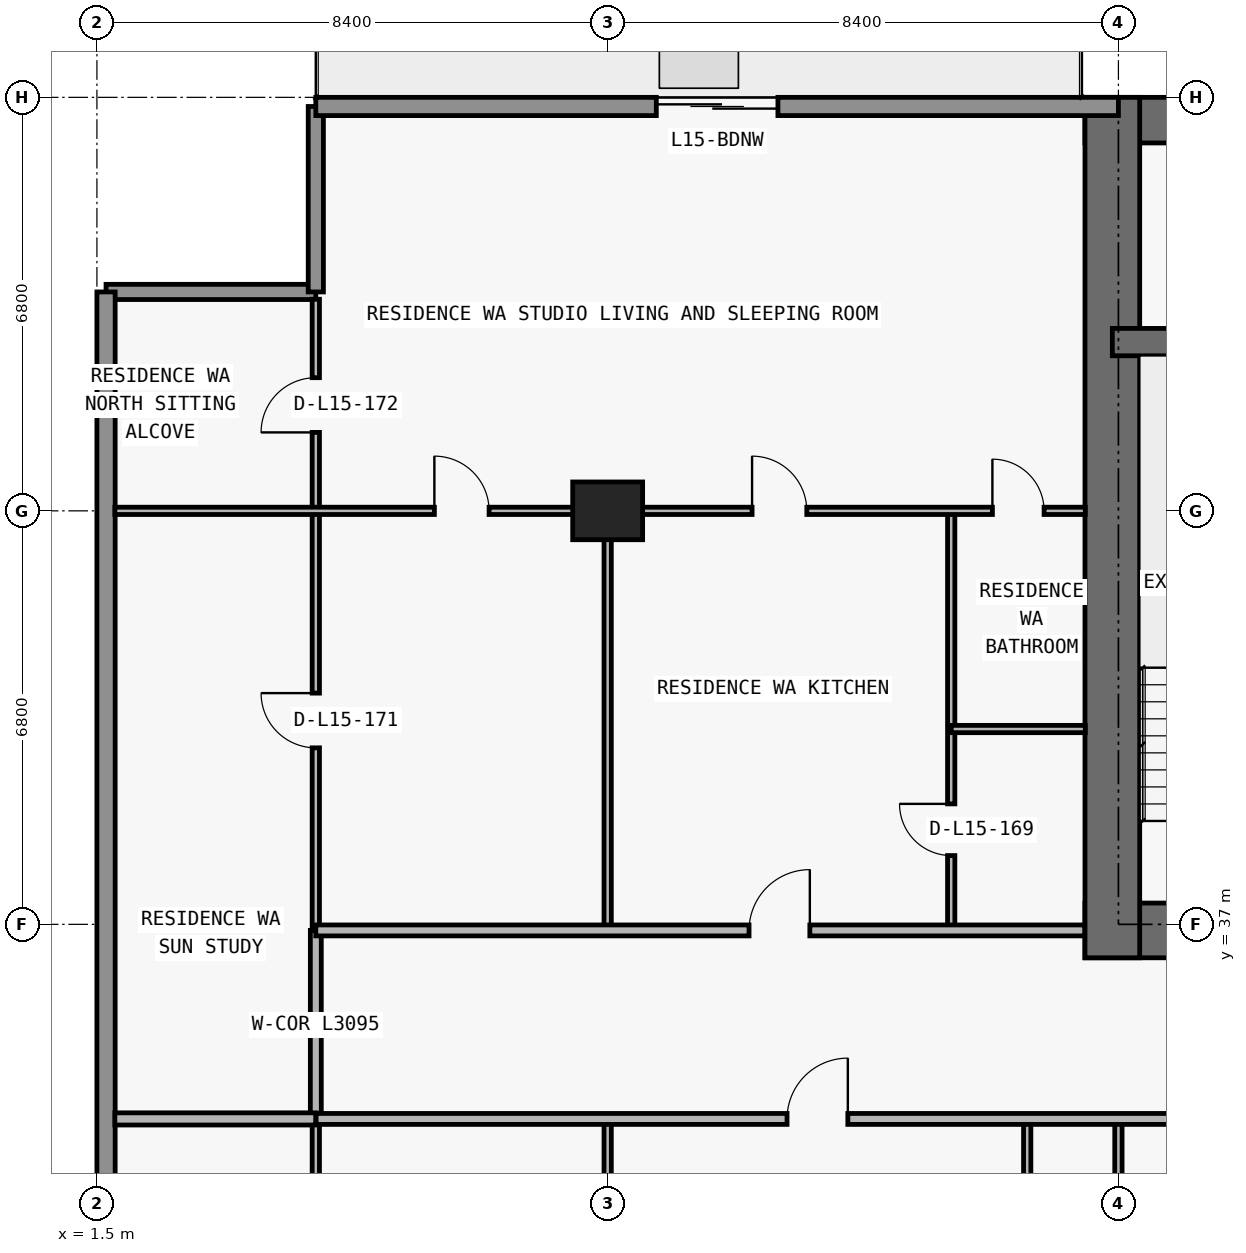
"""IFC4 building model, lengths in metres.
Left out: names, types, materials, properties, quantities, classifications, styles, units other than length and angle.
Written with IfcOpenShell. Run it as: python <this file> out.ifc"""

import sys

from ifc_helpers import new_model, si_unit, direction, frame, frame_2d, origin, origin_2d, place, context, subcontext, project, spatial, rectangle, extrude, element, fill, save


model = new_model("IFC4")
c1 = context("Model", 3, precision=1e-05, world=origin(), true_north=direction((0.0, 1.0)))
c2 = subcontext(c1, "Body", "Model", "MODEL_VIEW")
j1 = project(units=[si_unit("LENGTHUNIT", "METRE"), si_unit("PLANEANGLEUNIT", "RADIAN")], contexts=[c1])
p1 = place(None, origin())
s1 = spatial("IfcSite", under=j1, at=p1, CompositionType="ELEMENT")
p2 = place(p1, origin())
s2 = spatial("IfcBuilding", under=s1, at=p2, CompositionType="ELEMENT")
p3 = place(p2, frame((0.0, 0.0, 59.7)))
s3 = spatial("IfcBuildingStorey", under=s2, at=p3, CompositionType="ELEMENT", Elevation=59.7)
p4 = place(p3, frame((9.9, 43.8, 0.0), z_axis=(0.0, 0.0, 1.0), x_axis=(1.0, 0.0, 0.0)))
e1 = element("IfcColumn", 1, at=p4, inside=s3, PredefinedType="COLUMN", context=c2, shape_type="SweptSolid", body=[
    extrude(rectangle(XDim=1.15, YDim=0.95, at=origin_2d()), origin(), (0.0, 0.0, 1.0), 3.05),
])
p5 = place(p3, frame((17.75, 36.9, 0.0), z_axis=(0.0, 0.0, 1.0), x_axis=(1.0, 0.0, 0.0)))
e2 = element("IfcWall", 2, at=p5, inside=s3, PredefinedType="SHEAR", context=c2, shape_type="SweptSolid", body=[
    extrude(rectangle(XDim=42.3, YDim=0.9, at=frame_2d((21.15, 0.0))), origin(), (0.0, 0.0, 1.0), 3.05),
])
p6 = place(p5, frame((14.55, 0.0, 0.0)))
e3 = element("IfcOpeningElement", 3, at=p6, cuts=e2, PredefinedType="OPENING", context=c2, shape_type="SweptSolid", body=[
    extrude(rectangle(XDim=1.1, YDim=2.15, at=frame_2d((0.55, 1.075))), frame((0.0, 0.46, 0.0), z_axis=(0.0, -1.0, 0.0), x_axis=(1.0, 0.0, 0.0)), (0.0, 0.0, 1.0), 0.92),
])
p7 = place(p5, frame((6.4, 0.0, 0.0)))
e4 = element("IfcOpeningElement", 4, at=p7, cuts=e2, PredefinedType="OPENING", context=c2, shape_type="SweptSolid", body=[
    extrude(rectangle(XDim=1.05, YDim=2.15, at=frame_2d((0.525, 1.075))), frame((0.0, 0.46, 0.0), z_axis=(0.0, -1.0, 0.0), x_axis=(1.0, 0.0, 0.0)), (0.0, 0.0, 1.0), 0.92),
])
p8 = place(p5, frame((34.9, 0.0, 0.0)))
e5 = element("IfcOpeningElement", 5, at=p8, cuts=e2, PredefinedType="OPENING", context=c2, shape_type="SweptSolid", body=[
    extrude(rectangle(XDim=1.05, YDim=2.15, at=frame_2d((0.525, 1.075))), frame((0.0, 0.46, 0.0), z_axis=(0.0, -1.0, 0.0), x_axis=(1.0, 0.0, 0.0)), (0.0, 0.0, 1.0), 0.92),
])
p9 = place(p5, frame((11.012, 0.0, 0.0)))
e6 = element("IfcOpeningElement", 6, at=p9, cuts=e2, PredefinedType="OPENING", context=c2, shape_type="SweptSolid", body=[
    extrude(rectangle(XDim=1.05, YDim=2.15, at=frame_2d((0.525, 1.075))), frame((0.0, 0.46, 0.0), z_axis=(0.0, -1.0, 0.0), x_axis=(1.0, 0.0, 0.0)), (0.0, 0.0, 1.0), 0.92),
])
p10 = place(p5, frame((24.25, 0.0, 0.0)))
e7 = element("IfcOpeningElement", 7, at=p10, cuts=e2, PredefinedType="OPENING", context=c2, shape_type="SweptSolid", body=[
    extrude(rectangle(XDim=1.05, YDim=2.15, at=frame_2d((0.525, 1.075))), frame((0.0, 0.46, 0.0), z_axis=(0.0, -1.0, 0.0), x_axis=(1.0, 0.0, 0.0)), (0.0, 0.0, 1.0), 0.92),
])
p11 = place(p3, frame((17.75, 50.225, 0.0), z_axis=(0.0, 0.0, 1.0), x_axis=(1.0, 0.0, 0.0)))
e8 = element("IfcWall", 8, at=p11, inside=s3, PredefinedType="SHEAR", context=c2, shape_type="SweptSolid", body=[
    extrude(rectangle(XDim=42.3, YDim=0.75, at=frame_2d((21.15, 0.0))), origin(), (0.0, 0.0, 1.0), 3.05),
])
p12 = place(p3, frame((18.2, 36.45, 0.0), z_axis=(0.0, 0.0, 1.0), x_axis=(0.0, 1.0, 0.0)))
e9 = element("IfcWall", 9, at=p12, inside=s3, PredefinedType="SHEAR", context=c2, shape_type="SweptSolid", body=[
    extrude(rectangle(XDim=14.15, YDim=0.9, at=frame_2d((7.075, 0.0))), origin(), (0.0, 0.0, 1.0), 3.05),
])
p13 = place(p3, frame((18.2, 46.575, 0.0), z_axis=(0.0, 0.0, 1.0), x_axis=(1.0, 0.0, 0.0)))
e10 = element("IfcWall", 10, at=p13, inside=s3, PredefinedType="SHEAR", context=c2, shape_type="SweptSolid", body=[
    extrude(rectangle(XDim=41.4, YDim=0.45, at=frame_2d((20.7, 0.0))), origin(), (0.0, 0.0, 1.0), 3.05),
])
p14 = place(p13, frame((7.7, 0.0, 0.0)))
e11 = element("IfcOpeningElement", 11, at=p14, cuts=e10, PredefinedType="OPENING", context=c2, shape_type="SweptSolid", body=[
    extrude(rectangle(XDim=1.0, YDim=2.2, at=frame_2d((0.5, 1.1))), frame((0.0, 0.235, 0.0), z_axis=(0.0, -1.0, 0.0), x_axis=(1.0, 0.0, 0.0)), (0.0, 0.0, 1.0), 0.47),
])
p15 = place(p13, frame((32.725, 0.0, 0.0)))
e12 = element("IfcOpeningElement", 12, at=p15, cuts=e10, PredefinedType="OPENING", context=c2, shape_type="SweptSolid", body=[
    extrude(rectangle(XDim=1.05, YDim=2.15, at=frame_2d((0.525, 1.075))), frame((0.0, 0.235, 0.0), z_axis=(0.0, -1.0, 0.0), x_axis=(1.0, 0.0, 0.0)), (0.0, 0.0, 1.0), 0.47),
])
p16 = place(p3, frame((1.65, 47.4, 0.0), z_axis=(0.0, 0.0, 1.0), x_axis=(1.0, 0.0, 0.0)))
e13 = element("IfcWall", 13, at=p16, inside=s3, PredefinedType="ELEMENTEDWALL", context=c2, shape_type="SweptSolid", body=[
    extrude(rectangle(XDim=3.45, YDim=0.25, at=frame_2d((1.725, 0.0))), origin(), (0.0, 0.0, 1.0), 3.05),
])
p17 = place(p3, frame((5.1, 47.4, 0.0), z_axis=(0.0, 0.0, 1.0), x_axis=(0.0, 1.0, 0.0)))
e14 = element("IfcWall", 14, at=p17, inside=s3, PredefinedType="ELEMENTEDWALL", context=c2, shape_type="SweptSolid", body=[
    extrude(rectangle(XDim=3.05, YDim=0.25, at=frame_2d((1.525, 0.0))), origin(), (0.0, 0.0, 1.0), 3.05),
])
p18 = place(p3, frame((1.65, 26.8, 0.0), z_axis=(0.0, 0.0, 1.0), x_axis=(0.0, 1.0, 0.0)))
e15 = element("IfcWall", 15, at=p18, inside=s3, PredefinedType="STANDARD", context=c2, shape_type="SweptSolid", body=[
    extrude(rectangle(XDim=20.6, YDim=0.3, at=frame_2d((10.3, 0.0))), origin(), (0.0, 0.0, 1.0), 3.05),
])
p19 = place(p3, frame((5.1, 50.45, 0.0), z_axis=(0.0, 0.0, 1.0), x_axis=(1.0, 0.0, 0.0)))
e16 = element("IfcWall", 16, at=p19, inside=s3, PredefinedType="STANDARD", context=c2, shape_type="SweptSolid", body=[
    extrude(rectangle(XDim=13.2, YDim=0.3, at=frame_2d((6.6, 0.0))), origin(), (0.0, 0.0, 1.0), 3.05),
])
p20 = place(p19, frame((5.6, 0.0, 0.0)))
e17 = element("IfcOpeningElement", 17, at=p20, cuts=e16, PredefinedType="OPENING", context=c2, shape_type="SweptSolid", body=[
    extrude(rectangle(XDim=2.0, YDim=2.3, at=frame_2d((1.0, 1.15))), frame((0.0, 0.16, 0.0), z_axis=(0.0, -1.0, 0.0), x_axis=(1.0, 0.0, 0.0)), (0.0, 0.0, 1.0), 0.32),
])
p21 = place(p3, frame((5.1, 26.98, 0.0), z_axis=(0.0, 0.0, 1.0), x_axis=(0.0, 1.0, 0.0)))
e18 = element("IfcWall", 18, at=p21, inside=s3, PredefinedType="PARTITIONING", context=c2, shape_type="SweptSolid", body=[
    extrude(rectangle(XDim=6.82, YDim=0.12, at=frame_2d((3.41, 0.0))), origin(), (0.0, 0.0, 1.0), 3.05),
])
p22 = place(p3, frame((5.1, 33.805, 0.0), z_axis=(0.0, 0.0, 1.0), x_axis=(0.0, 1.0, 0.0)))
e19 = element("IfcWall", 19, at=p22, inside=s3, PredefinedType="PARTITIONING", context=c2, shape_type="SweptSolid", body=[
    extrude(rectangle(XDim=3.095, YDim=0.18, at=frame_2d((1.547, 0.0))), origin(), (0.0, 0.0, 1.0), 3.05),
])
p23 = place(p3, frame((5.1, 36.905, 0.0), z_axis=(0.0, 0.0, 1.0), x_axis=(0.0, 1.0, 0.0)))
e20 = element("IfcWall", 20, at=p23, inside=s3, PredefinedType="PARTITIONING", context=c2, shape_type="SweptSolid", body=[
    extrude(rectangle(XDim=10.375, YDim=0.12, at=frame_2d((5.188, 0.0))), origin(), (0.0, 0.0, 1.0), 3.05),
])
p24 = place(p23, frame((2.998, 0.0, 0.0)))
e21 = element("IfcOpeningElement", 21, at=p24, cuts=e20, PredefinedType="OPENING", context=c2, shape_type="SweptSolid", body=[
    extrude(rectangle(XDim=0.9, YDim=2.15, at=frame_2d((0.45, 1.075))), frame((0.0, 0.07, 0.0), z_axis=(0.0, -1.0, 0.0), x_axis=(1.0, 0.0, 0.0)), (0.0, 0.0, 1.0), 0.14),
])
p25 = place(p23, frame((8.185, 0.0, 0.0)))
e22 = element("IfcOpeningElement", 22, at=p25, cuts=e20, PredefinedType="OPENING", context=c2, shape_type="SweptSolid", body=[
    extrude(rectangle(XDim=0.9, YDim=2.15, at=frame_2d((0.45, 1.075))), frame((0.0, 0.07, 0.0), z_axis=(0.0, -1.0, 0.0), x_axis=(1.0, 0.0, 0.0)), (0.0, 0.0, 1.0), 0.14),
])
p26 = place(p3, frame((9.9, 26.98, 0.0), z_axis=(0.0, 0.0, 1.0), x_axis=(0.0, 1.0, 0.0)))
e23 = element("IfcWall", 23, at=p26, inside=s3, PredefinedType="PARTITIONING", context=c2, shape_type="SweptSolid", body=[
    extrude(rectangle(XDim=6.82, YDim=0.12, at=frame_2d((3.41, 0.0))), origin(), (0.0, 0.0, 1.0), 2.11),
])
p27 = place(p3, frame((9.9, 36.9, 0.0), z_axis=(0.0, 0.0, 1.0), x_axis=(0.0, 1.0, 0.0)))
e24 = element("IfcWall", 24, at=p27, inside=s3, PredefinedType="PARTITIONING", context=c2, shape_type="SweptSolid", body=[
    extrude(rectangle(XDim=6.9, YDim=0.12, at=frame_2d((3.45, 0.0))), origin(), (0.0, 0.0, 1.0), 2.11),
])
p28 = place(p3, frame((15.55, 36.9, 0.0), z_axis=(0.0, 0.0, 1.0), x_axis=(0.0, 1.0, 0.0)))
e25 = element("IfcWall", 25, at=p28, inside=s3, PredefinedType="PARTITIONING", context=c2, shape_type="SweptSolid", body=[
    extrude(rectangle(XDim=6.9, YDim=0.12, at=frame_2d((3.45, 0.0))), origin(), (0.0, 0.0, 1.0), 3.05),
])
p29 = place(p28, frame((1.231, 0.0, 0.0)))
e26 = element("IfcOpeningElement", 26, at=p29, cuts=e25, PredefinedType="OPENING", context=c2, shape_type="SweptSolid", body=[
    extrude(rectangle(XDim=0.85, YDim=2.1, at=frame_2d((0.425, 1.05))), frame((0.0, 0.07, 0.0), z_axis=(0.0, -1.0, 0.0), x_axis=(1.0, 0.0, 0.0)), (0.0, 0.0, 1.0), 0.14),
])
p30 = place(p3, frame((16.8, 26.98, 0.0), z_axis=(0.0, 0.0, 1.0), x_axis=(0.0, 1.0, 0.0)))
e27 = element("IfcWall", 27, at=p30, inside=s3, PredefinedType="PARTITIONING", context=c2, shape_type="SweptSolid", body=[
    extrude(rectangle(XDim=6.82, YDim=0.12, at=frame_2d((3.41, 0.0))), origin(), (0.0, 0.0, 1.0), 3.05),
])
p31 = place(p30, frame((3.435, 0.0, 0.0)))
e28 = element("IfcOpeningElement", 28, at=p31, cuts=e27, PredefinedType="OPENING", context=c2, shape_type="SweptSolid", body=[
    extrude(rectangle(XDim=0.85, YDim=2.1, at=frame_2d((0.425, 1.05))), frame((0.0, 0.07, 0.0), z_axis=(0.0, -1.0, 0.0), x_axis=(1.0, 0.0, 0.0)), (0.0, 0.0, 1.0), 0.14),
])
p32 = place(p3, frame((18.3, 26.98, 0.0), z_axis=(0.0, 0.0, 1.0), x_axis=(0.0, 1.0, 0.0)))
e29 = element("IfcWall", 29, at=p32, inside=s3, PredefinedType="PARTITIONING", context=c2, shape_type="SweptSolid", body=[
    extrude(rectangle(XDim=6.82, YDim=0.12, at=frame_2d((3.41, 0.0))), origin(), (0.0, 0.0, 1.0), 2.11),
])
p33 = place(p3, frame((1.795, 33.8, 0.0), z_axis=(0.0, 0.0, 1.0), x_axis=(1.0, 0.0, 0.0)))
e30 = element("IfcWall", 30, at=p33, inside=s3, PredefinedType="PARTITIONING", context=c2, shape_type="SweptSolid", body=[
    extrude(rectangle(XDim=3.305, YDim=0.2, at=frame_2d((1.653, 0.0))), origin(), (0.0, 0.0, 1.0), 3.05),
])
p34 = place(p3, frame((5.105, 33.8, 0.0), z_axis=(0.0, 0.0, 1.0), x_axis=(1.0, 0.0, 0.0)))
e31 = element("IfcWall", 31, at=p34, inside=s3, PredefinedType="PARTITIONING", context=c2, shape_type="SweptSolid", body=[
    extrude(rectangle(XDim=67.595, YDim=0.18, at=frame_2d((33.797, 0.0))), origin(), (0.0, 0.0, 1.0), 3.05),
])
p35 = place(p34, frame((7.745, 0.0, 0.0)))
e32 = element("IfcOpeningElement", 32, at=p35, cuts=e31, PredefinedType="OPENING", context=c2, shape_type="SweptSolid", body=[
    extrude(rectangle(XDim=1.0, YDim=2.2, at=frame_2d((0.5, 1.1))), frame((0.0, 0.1, 0.0), z_axis=(0.0, -1.0, 0.0), x_axis=(1.0, 0.0, 0.0)), (0.0, 0.0, 1.0), 0.2),
])
p36 = place(p34, frame((24.545, 0.0, 0.0)))
e33 = element("IfcOpeningElement", 33, at=p36, cuts=e31, PredefinedType="OPENING", context=c2, shape_type="SweptSolid", body=[
    extrude(rectangle(XDim=1.0, YDim=2.2, at=frame_2d((0.5, 1.1))), frame((0.0, 0.1, 0.0), z_axis=(0.0, -1.0, 0.0), x_axis=(1.0, 0.0, 0.0)), (0.0, 0.0, 1.0), 0.2),
])
p37 = place(p34, frame((40.47, 0.0, 0.0)))
e34 = element("IfcOpeningElement", 34, at=p37, cuts=e31, PredefinedType="OPENING", context=c2, shape_type="SweptSolid", body=[
    extrude(rectangle(XDim=1.0, YDim=2.2, at=frame_2d((0.5, 1.1))), frame((0.0, 0.1, 0.0), z_axis=(0.0, -1.0, 0.0), x_axis=(1.0, 0.0, 0.0)), (0.0, 0.0, 1.0), 0.2),
])
p38 = place(p34, frame((48.87, 0.0, 0.0)))
e35 = element("IfcOpeningElement", 35, at=p38, cuts=e31, PredefinedType="OPENING", context=c2, shape_type="SweptSolid", body=[
    extrude(rectangle(XDim=1.0, YDim=2.2, at=frame_2d((0.5, 1.1))), frame((0.0, 0.1, 0.0), z_axis=(0.0, -1.0, 0.0), x_axis=(1.0, 0.0, 0.0)), (0.0, 0.0, 1.0), 0.2),
])
p39 = place(p34, frame((57.27, 0.0, 0.0)))
e36 = element("IfcOpeningElement", 36, at=p39, cuts=e31, PredefinedType="OPENING", context=c2, shape_type="SweptSolid", body=[
    extrude(rectangle(XDim=1.0, YDim=2.2, at=frame_2d((0.5, 1.1))), frame((0.0, 0.1, 0.0), z_axis=(0.0, -1.0, 0.0), x_axis=(1.0, 0.0, 0.0)), (0.0, 0.0, 1.0), 0.2),
])
p40 = place(p3, frame((5.1, 36.9, 0.0), z_axis=(0.0, 0.0, 1.0), x_axis=(1.0, 0.0, 0.0)))
e37 = element("IfcWall", 37, at=p40, inside=s3, PredefinedType="PARTITIONING", context=c2, shape_type="SweptSolid", body=[
    extrude(rectangle(XDim=12.645, YDim=0.18, at=frame_2d((6.323, 0.0))), origin(), (0.0, 0.0, 1.0), 3.05),
])
p41 = place(p40, frame((7.125, 0.0, 0.0)))
e38 = element("IfcOpeningElement", 38, at=p41, cuts=e37, PredefinedType="OPENING", context=c2, shape_type="SweptSolid", body=[
    extrude(rectangle(XDim=1.0, YDim=2.2, at=frame_2d((0.5, 1.1))), frame((0.0, 0.1, 0.0), z_axis=(0.0, -1.0, 0.0), x_axis=(1.0, 0.0, 0.0)), (0.0, 0.0, 1.0), 0.2),
])
p42 = place(p3, frame((15.55, 40.212, 0.0), z_axis=(0.0, 0.0, 1.0), x_axis=(1.0, 0.0, 0.0)))
e39 = element("IfcWall", 39, at=p42, inside=s3, PredefinedType="PARTITIONING", context=c2, shape_type="SweptSolid", body=[
    extrude(rectangle(XDim=2.205, YDim=0.12, at=frame_2d((1.103, 0.0))), origin(), (0.0, 0.0, 1.0), 3.05),
])
p43 = place(p3, frame((1.795, 43.8, 0.0), z_axis=(0.0, 0.0, 1.0), x_axis=(1.0, 0.0, 0.0)))
e40 = element("IfcWall", 40, at=p43, inside=s3, PredefinedType="PARTITIONING", context=c2, shape_type="SweptSolid", body=[
    extrude(rectangle(XDim=15.96, YDim=0.12, at=frame_2d((7.98, 0.0))), origin(), (0.0, 0.0, 1.0), 2.339),
])
p44 = place(p43, frame((5.255, 0.0, 0.0)))
e41 = element("IfcOpeningElement", 41, at=p44, cuts=e40, PredefinedType="OPENING", context=c2, shape_type="SweptSolid", body=[
    extrude(rectangle(XDim=0.9, YDim=2.15, at=frame_2d((0.45, 1.075))), frame((0.0, 0.07, 0.0), z_axis=(0.0, -1.0, 0.0), x_axis=(1.0, 0.0, 0.0)), (0.0, 0.0, 1.0), 0.14),
])
p45 = place(p43, frame((10.48, 0.0, 0.0)))
e42 = element("IfcOpeningElement", 42, at=p45, cuts=e40, PredefinedType="OPENING", context=c2, shape_type="SweptSolid", body=[
    extrude(rectangle(XDim=0.9, YDim=2.15, at=frame_2d((0.45, 1.075))), frame((0.0, 0.07, 0.0), z_axis=(0.0, -1.0, 0.0), x_axis=(1.0, 0.0, 0.0)), (0.0, 0.0, 1.0), 0.14),
])
p46 = place(p43, frame((14.433, 0.0, 0.0)))
e43 = element("IfcOpeningElement", 43, at=p46, cuts=e40, PredefinedType="OPENING", context=c2, shape_type="SweptSolid", body=[
    extrude(rectangle(XDim=0.85, YDim=2.1, at=frame_2d((0.425, 1.05))), frame((0.0, 0.07, 0.0), z_axis=(0.0, -1.0, 0.0), x_axis=(1.0, 0.0, 0.0)), (0.0, 0.0, 1.0), 0.14),
])
p47 = place(p20, origin())
e44 = element("IfcDoor", 44, at=p47, inside=s3, OperationType="DOUBLE_DOOR_SLIDING", PredefinedType="DOOR", context=c2, shape_type="SweptSolid", body=[
    extrude(rectangle(XDim=2.0, YDim=2.3, at=frame_2d((1.0, 1.15))), frame((0.0, 0.025, 0.0), z_axis=(0.0, -1.0, 0.0), x_axis=(1.0, 0.0, 0.0)), (0.0, 0.0, 1.0), 0.05),
])
fill(e17, e44)
p48 = place(p35, origin())
e45 = element("IfcDoor", 45, at=p48, inside=s3, OperationType="SINGLE_SWING_RIGHT", PredefinedType="DOOR", context=c2, shape_type="SweptSolid", body=[
    extrude(rectangle(XDim=1.0, YDim=2.2, at=frame_2d((0.5, 1.1))), frame((0.0, 0.025, 0.0), z_axis=(0.0, -1.0, 0.0), x_axis=(1.0, 0.0, 0.0)), (0.0, 0.0, 1.0), 0.05),
])
fill(e32, e45)
p49 = place(p44, origin())
e46 = element("IfcDoor", 46, at=p49, inside=s3, OperationType="SINGLE_SWING_LEFT", PredefinedType="DOOR", context=c2, shape_type="SweptSolid", body=[
    extrude(rectangle(XDim=0.9, YDim=2.15, at=frame_2d((0.45, 1.075))), frame((0.0, 0.025, 0.0), z_axis=(0.0, -1.0, 0.0), x_axis=(1.0, 0.0, 0.0)), (0.0, 0.0, 1.0), 0.05),
])
fill(e41, e46)
p50 = place(p41, origin())
e47 = element("IfcDoor", 47, at=p50, inside=s3, OperationType="SINGLE_SWING_RIGHT", PredefinedType="DOOR", context=c2, shape_type="SweptSolid", body=[
    extrude(rectangle(XDim=1.0, YDim=2.2, at=frame_2d((0.5, 1.1))), frame((0.0, 0.025, 0.0), z_axis=(0.0, -1.0, 0.0), x_axis=(1.0, 0.0, 0.0)), (0.0, 0.0, 1.0), 0.05),
])
fill(e38, e47)
p51 = place(p45, origin())
e48 = element("IfcDoor", 48, at=p51, inside=s3, OperationType="SINGLE_SWING_LEFT", PredefinedType="DOOR", context=c2, shape_type="SweptSolid", body=[
    extrude(rectangle(XDim=0.9, YDim=2.15, at=frame_2d((0.45, 1.075))), frame((0.0, 0.025, 0.0), z_axis=(0.0, -1.0, 0.0), x_axis=(1.0, 0.0, 0.0)), (0.0, 0.0, 1.0), 0.05),
])
fill(e42, e48)
p52 = place(p29, origin())
e49 = element("IfcDoor", 49, at=p52, inside=s3, OperationType="SINGLE_SWING_RIGHT", PredefinedType="DOOR", context=c2, shape_type="SweptSolid", body=[
    extrude(rectangle(XDim=0.85, YDim=2.1, at=frame_2d((0.425, 1.05))), frame((0.0, 0.025, 0.0), z_axis=(0.0, -1.0, 0.0), x_axis=(1.0, 0.0, 0.0)), (0.0, 0.0, 1.0), 0.05),
])
fill(e26, e49)
p53 = place(p46, origin())
e50 = element("IfcDoor", 50, at=p53, inside=s3, OperationType="SINGLE_SWING_LEFT", PredefinedType="DOOR", context=c2, shape_type="SweptSolid", body=[
    extrude(rectangle(XDim=0.85, YDim=2.1, at=frame_2d((0.425, 1.05))), frame((0.0, 0.025, 0.0), z_axis=(0.0, -1.0, 0.0), x_axis=(1.0, 0.0, 0.0)), (0.0, 0.0, 1.0), 0.05),
])
fill(e43, e50)
p54 = place(p24, origin())
e51 = element("IfcDoor", 51, at=p54, inside=s3, OperationType="SINGLE_SWING_RIGHT", PredefinedType="DOOR", context=c2, shape_type="SweptSolid", body=[
    extrude(rectangle(XDim=0.9, YDim=2.15, at=frame_2d((0.45, 1.075))), frame((0.0, 0.025, 0.0), z_axis=(0.0, -1.0, 0.0), x_axis=(1.0, 0.0, 0.0)), (0.0, 0.0, 1.0), 0.05),
])
fill(e21, e51)
p55 = place(p25, origin())
e52 = element("IfcDoor", 52, at=p55, inside=s3, OperationType="SINGLE_SWING_LEFT", PredefinedType="DOOR", context=c2, shape_type="SweptSolid", body=[
    extrude(rectangle(XDim=0.9, YDim=2.15, at=frame_2d((0.45, 1.075))), frame((0.0, 0.025, 0.0), z_axis=(0.0, -1.0, 0.0), x_axis=(1.0, 0.0, 0.0)), (0.0, 0.0, 1.0), 0.05),
])
fill(e22, e52)
save(model, sys.argv[1])
